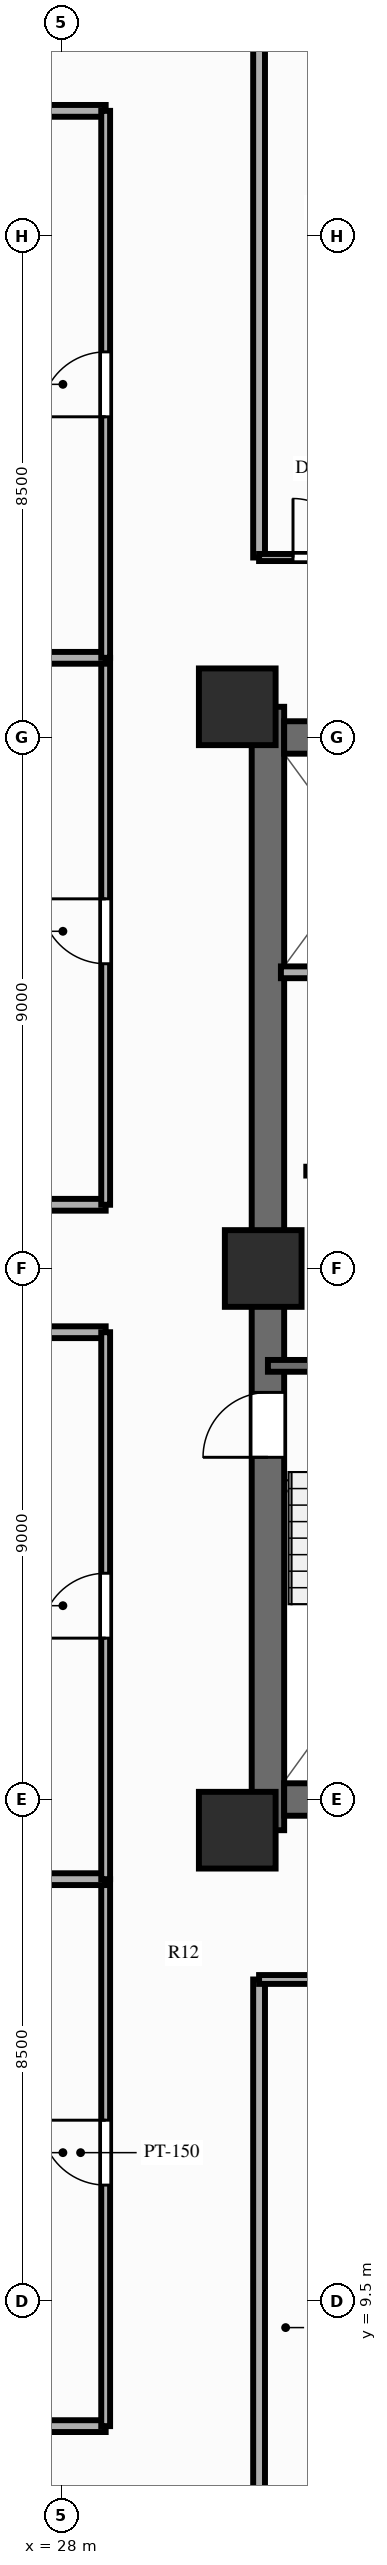
"""IFC4 building model, lengths in metres.
Left out: names, types, materials, properties, quantities, classifications, styles, units other than length and angle.
Written with IfcOpenShell. Run it as: python <this file> out.ifc"""

import sys

from ifc_helpers import new_model, si_unit, direction, frame, frame_2d, origin, origin_2d, place, context, subcontext, project, spatial, rectangle, extrude, source, transform, mapped, element, fill, save


model = new_model("IFC4")
c1 = context("Model", 3, precision=1e-05, world=origin(), true_north=direction((0.0, 1.0)))
c2 = subcontext(c1, "Body", "Model", "MODEL_VIEW")
j1 = project(units=[si_unit("LENGTHUNIT", "METRE"), si_unit("PLANEANGLEUNIT", "RADIAN")], contexts=[c1])
p1 = place(None, origin())
s1 = spatial("IfcSite", under=j1, at=p1, CompositionType="ELEMENT")
p2 = place(p1, origin())
s2 = spatial("IfcBuilding", under=s1, at=p2, CompositionType="ELEMENT")
p3 = place(p2, frame((0.0, 0.0, 95.85)))
s3 = spatial("IfcBuildingStorey", under=s2, at=p3, CompositionType="ELEMENT", Elevation=95.85)
p4 = place(p3, frame((31.5, 17.48, 0.0), z_axis=(0.0, 0.0, 1.0), x_axis=(0.0, 1.0, 0.0)))
e1 = element("IfcWall", 1, at=p4, inside=s3, PredefinedType="SHEAR", context=c2, shape_type="SweptSolid", body=[
    extrude(rectangle(XDim=19.04, YDim=0.55, at=frame_2d((9.52, 0.0))), origin(), (0.0, 0.0, 1.0), 3.0),
])
p5 = place(p4, frame((6.32, 0.0, 0.0)))
e2 = element("IfcOpeningElement", 2, at=p5, cuts=e1, PredefinedType="OPENING", context=c2, shape_type="SweptSolid", body=[
    extrude(rectangle(XDim=1.1, YDim=2.15, at=frame_2d((0.55, 1.075))), frame((0.0, 0.287, 0.0), z_axis=(0.0, -1.0, 0.0), x_axis=(1.0, 0.0, 0.0)), (0.0, 0.0, 1.0), 0.574),
])
p6 = place(p3, frame((31.775, 18.0, 0.0), z_axis=(0.0, 0.0, 1.0), x_axis=(1.0, 0.0, 0.0)))
e3 = element("IfcWall", 3, at=p6, inside=s3, PredefinedType="SHEAR", context=c2, shape_type="SweptSolid", body=[
    extrude(rectangle(XDim=12.45, YDim=0.55, at=frame_2d((6.225, 0.0))), origin(), (0.0, 0.0, 1.0), 3.0),
])
p7 = place(p3, frame((31.775, 36.0, 0.0), z_axis=(0.0, 0.0, 1.0), x_axis=(1.0, 0.0, 0.0)))
e4 = element("IfcWall", 4, at=p7, inside=s3, PredefinedType="SHEAR", context=c2, shape_type="SweptSolid", body=[
    extrude(rectangle(XDim=12.45, YDim=0.55, at=frame_2d((6.225, 0.0))), origin(), (0.0, 0.0, 1.0), 3.0),
])
p8 = place(p7, frame((5.175, 0.0, 0.0), z_axis=(0.0, 0.0, 1.0), x_axis=(-1.0, 0.0, 0.0)))
e5 = element("IfcOpeningElement", 5, at=p8, cuts=e4, PredefinedType="OPENING", context=c2, shape_type="SweptSolid", body=[
    extrude(rectangle(XDim=1.4, YDim=2.15, at=frame_2d((0.7, 1.075))), frame((0.0, 0.287, 0.0), z_axis=(0.0, -1.0, 0.0), x_axis=(1.0, 0.0, 0.0)), (0.0, 0.0, 1.0), 0.574),
])
m1 = source(origin(), c2, "Body", "SweptSolid", [
    extrude(rectangle(XDim=1.3, YDim=1.3, at=origin_2d()), origin(), (0.0, 0.0, 1.0), 3.0),
])
for number, where, z_axis, x_axis in (
    (6, (30.98, 17.48, 0.0), (0.0, 0.0, 1.0), (1.0, 0.0, 0.0)),
    (7, (30.98, 36.52, 0.0), (0.0, 0.0, 1.0), (1.0, 0.0, 0.0)),
    (8, (31.42, 27.0, 0.0), (0.0, 0.0, 1.0), (1.0, 0.0, 0.0)),
):
    element("IfcColumn", number, at=place(p3, frame(where, z_axis=z_axis, x_axis=x_axis)), inside=s3, PredefinedType="COLUMN", context=c2, shape_type="MappedRepresentation", body=[
        mapped(m1, transform((0.0, 0.0, 0.0), scale=1.0)),
    ])
p9 = place(p3, frame((32.15, 28.65, 0.0), z_axis=(0.0, 0.0, 1.0), x_axis=(1.0, 0.0, 0.0)))
e9 = element("IfcWall", 9, at=p9, inside=s3, PredefinedType="PARTITIONING", context=c2, shape_type="SweptSolid", body=[
    extrude(rectangle(XDim=2.27, YDim=0.15, at=frame_2d((1.135, 0.0))), origin(), (0.0, 0.0, 1.0), 2.14),
])
p10 = place(p3, frame((31.5, 25.35, 0.0), z_axis=(0.0, 0.0, 1.0), x_axis=(1.0, 0.0, 0.0)))
e10 = element("IfcWall", 10, at=p10, inside=s3, PredefinedType="SOLIDWALL", context=c2, shape_type="SweptSolid", body=[
    extrude(rectangle(XDim=3.93, YDim=0.2, at=frame_2d((1.965, 0.0))), origin(), (0.0, 0.0, 1.0), 2.79),
])
p11 = place(p3, frame((31.72, 32.02, 0.0), z_axis=(0.0, 0.0, 1.0), x_axis=(1.0, 0.0, 0.0)))
e11 = element("IfcWall", 11, at=p11, inside=s3, PredefinedType="PARTITIONING", context=c2, shape_type="SweptSolid", body=[
    extrude(rectangle(XDim=2.8, YDim=0.2, at=frame_2d((1.4, 0.0))), origin(), (0.0, 0.0, 1.0), 2.79),
])
p12 = place(p3, frame((31.35, 14.95, 0.0), z_axis=(0.0, 0.0, 1.0), x_axis=(0.0, -1.0, 0.0)))
e12 = element("IfcWall", 12, at=p12, inside=s3, PredefinedType="PARTITIONING", context=c2, shape_type="SweptSolid", body=[
    extrude(rectangle(XDim=11.8, YDim=0.2, at=frame_2d((5.9, 0.0))), origin(), (0.0, 0.0, 1.0), 2.34),
])
p13 = place(p3, frame((31.35, 14.95, 0.0), z_axis=(0.0, 0.0, 1.0), x_axis=(1.0, 0.0, 0.0)))
e13 = element("IfcWall", 13, at=p13, inside=s3, PredefinedType="PARTITIONING", context=c2, shape_type="SweptSolid", body=[
    extrude(rectangle(XDim=6.384, YDim=0.15, at=frame_2d((3.192, 0.0))), origin(), (0.0, 0.0, 1.0), 2.79),
])
p14 = place(p13, frame((2.642, 0.0, 0.0)))
e14 = element("IfcOpeningElement", 14, at=p14, cuts=e13, PredefinedType="OPENING", context=c2, shape_type="SweptSolid", body=[
    extrude(rectangle(XDim=1.1, YDim=2.15, at=frame_2d((0.55, 1.075))), frame((0.0, 0.087, 0.0), z_axis=(0.0, -1.0, 0.0), x_axis=(1.0, 0.0, 0.0)), (0.0, 0.0, 1.0), 0.174),
])
p15 = place(p3, frame((31.35, 39.05, 0.0), z_axis=(0.0, 0.0, 1.0), x_axis=(0.0, 1.0, 0.0)))
e15 = element("IfcWall", 15, at=p15, inside=s3, PredefinedType="PARTITIONING", context=c2, shape_type="SweptSolid", body=[
    extrude(rectangle(XDim=11.8, YDim=0.2, at=frame_2d((5.9, 0.0))), origin(), (0.0, 0.0, 1.0), 2.34),
])
p16 = place(p3, frame((31.35, 39.05, 0.0), z_axis=(0.0, 0.0, 1.0), x_axis=(1.0, 0.0, 0.0)))
e16 = element("IfcWall", 16, at=p16, inside=s3, PredefinedType="PARTITIONING", context=c2, shape_type="SweptSolid", body=[
    extrude(rectangle(XDim=2.15, YDim=0.12, at=frame_2d((1.075, 0.0))), origin(), (0.0, 0.0, 1.0), 2.79),
])
p17 = place(p16, frame((0.575, 0.0, 0.0)))
e17 = element("IfcOpeningElement", 17, at=p17, cuts=e16, PredefinedType="OPENING", context=c2, shape_type="SweptSolid", body=[
    extrude(rectangle(XDim=1.0, YDim=2.1, at=frame_2d((0.5, 1.05))), frame((0.0, 0.072, 0.0), z_axis=(0.0, -1.0, 0.0), x_axis=(1.0, 0.0, 0.0)), (0.0, 0.0, 1.0), 0.144),
])
for number, where, z_axis, x_axis in (
    (18, (28.75, 7.38, 0.0), (0.0, 0.0, 1.0), (-1.0, 0.0, 0.0)),
    (19, (28.75, 25.92, 0.0), (0.0, 0.0, 1.0), (-1.0, 0.0, 0.0)),
):
    element("IfcWall", number, at=place(p3, frame(where, z_axis=z_axis, x_axis=x_axis)), inside=s3, PredefinedType="PARTITIONING", context=c2, shape_type="SweptSolid", body=[
        extrude(rectangle(XDim=16.6, YDim=0.2, at=frame_2d((8.3, 0.0))), origin(), (0.0, 0.0, 1.0), 2.79),
    ])
p18 = place(p3, frame((28.75, 7.38, 0.0), z_axis=(0.0, 0.0, 1.0), x_axis=(0.0, 1.0, 0.0)))
e20 = element("IfcWall", 20, at=p18, inside=s3, PredefinedType="PARTITIONING", context=c2, shape_type="SweptSolid", body=[
    extrude(rectangle(XDim=9.27, YDim=0.15, at=frame_2d((4.635, 0.0))), origin(), (0.0, 0.0, 1.0), 2.79),
])
p19 = place(p18, frame((4.085, 0.0, 0.0)))
e21 = element("IfcOpeningElement", 21, at=p19, cuts=e20, PredefinedType="OPENING", context=c2, shape_type="SweptSolid", body=[
    extrude(rectangle(XDim=1.1, YDim=2.15, at=frame_2d((0.55, 1.075))), frame((0.0, 0.087, 0.0), z_axis=(0.0, -1.0, 0.0), x_axis=(1.0, 0.0, 0.0)), (0.0, 0.0, 1.0), 0.174),
])
p20 = place(p3, frame((28.75, 16.65, 0.0), z_axis=(0.0, 0.0, 1.0), x_axis=(-1.0, 0.0, 0.0)))
e22 = element("IfcWall", 22, at=p20, inside=s3, PredefinedType="PARTITIONING", context=c2, shape_type="SweptSolid", body=[
    extrude(rectangle(XDim=16.6, YDim=0.2, at=frame_2d((8.3, 0.0))), origin(), (0.0, 0.0, 1.0), 2.79),
])
p21 = place(p3, frame((28.75, 16.65, 0.0), z_axis=(0.0, 0.0, 1.0), x_axis=(0.0, 1.0, 0.0)))
e23 = element("IfcWall", 23, at=p21, inside=s3, PredefinedType="PARTITIONING", context=c2, shape_type="SweptSolid", body=[
    extrude(rectangle(XDim=9.27, YDim=0.15, at=frame_2d((4.635, 0.0))), origin(), (0.0, 0.0, 1.0), 2.79),
])
p22 = place(p21, frame((4.085, 0.0, 0.0)))
e24 = element("IfcOpeningElement", 24, at=p22, cuts=e23, PredefinedType="OPENING", context=c2, shape_type="SweptSolid", body=[
    extrude(rectangle(XDim=1.1, YDim=2.15, at=frame_2d((0.55, 1.075))), frame((0.0, 0.087, 0.0), z_axis=(0.0, -1.0, 0.0), x_axis=(1.0, 0.0, 0.0)), (0.0, 0.0, 1.0), 0.174),
])
for number, where, z_axis, x_axis in (
    (25, (28.75, 28.08, 0.0), (0.0, 0.0, 1.0), (-1.0, 0.0, 0.0)),
    (26, (28.75, 46.62, 0.0), (0.0, 0.0, 1.0), (-1.0, 0.0, 0.0)),
):
    element("IfcWall", number, at=place(p3, frame(where, z_axis=z_axis, x_axis=x_axis)), inside=s3, PredefinedType="PARTITIONING", context=c2, shape_type="SweptSolid", body=[
        extrude(rectangle(XDim=16.6, YDim=0.2, at=frame_2d((8.3, 0.0))), origin(), (0.0, 0.0, 1.0), 2.79),
    ])
p23 = place(p3, frame((28.75, 28.08, 0.0), z_axis=(0.0, 0.0, 1.0), x_axis=(0.0, 1.0, 0.0)))
e27 = element("IfcWall", 27, at=p23, inside=s3, PredefinedType="PARTITIONING", context=c2, shape_type="SweptSolid", body=[
    extrude(rectangle(XDim=9.27, YDim=0.15, at=frame_2d((4.635, 0.0))), origin(), (0.0, 0.0, 1.0), 2.79),
])
p24 = place(p23, frame((4.085, 0.0, 0.0)))
e28 = element("IfcOpeningElement", 28, at=p24, cuts=e27, PredefinedType="OPENING", context=c2, shape_type="SweptSolid", body=[
    extrude(rectangle(XDim=1.1, YDim=2.15, at=frame_2d((0.55, 1.075))), frame((0.0, 0.087, 0.0), z_axis=(0.0, -1.0, 0.0), x_axis=(1.0, 0.0, 0.0)), (0.0, 0.0, 1.0), 0.174),
])
p25 = place(p3, frame((28.75, 37.35, 0.0), z_axis=(0.0, 0.0, 1.0), x_axis=(-1.0, 0.0, 0.0)))
e29 = element("IfcWall", 29, at=p25, inside=s3, PredefinedType="PARTITIONING", context=c2, shape_type="SweptSolid", body=[
    extrude(rectangle(XDim=16.6, YDim=0.2, at=frame_2d((8.3, 0.0))), origin(), (0.0, 0.0, 1.0), 2.79),
])
p26 = place(p3, frame((28.75, 37.35, 0.0), z_axis=(0.0, 0.0, 1.0), x_axis=(0.0, 1.0, 0.0)))
e30 = element("IfcWall", 30, at=p26, inside=s3, PredefinedType="PARTITIONING", context=c2, shape_type="SweptSolid", body=[
    extrude(rectangle(XDim=9.27, YDim=0.15, at=frame_2d((4.635, 0.0))), origin(), (0.0, 0.0, 1.0), 2.79),
])
p27 = place(p26, frame((4.085, 0.0, 0.0)))
e31 = element("IfcOpeningElement", 31, at=p27, cuts=e30, PredefinedType="OPENING", context=c2, shape_type="SweptSolid", body=[
    extrude(rectangle(XDim=1.1, YDim=2.15, at=frame_2d((0.55, 1.075))), frame((0.0, 0.087, 0.0), z_axis=(0.0, -1.0, 0.0), x_axis=(1.0, 0.0, 0.0)), (0.0, 0.0, 1.0), 0.174),
])
m2 = source(origin(), c2, "Body", "SweptSolid", [
    extrude(rectangle(XDim=1.1, YDim=2.15, at=frame_2d((0.55, 1.075))), frame((0.0, 0.025, 0.0), z_axis=(0.0, -1.0, 0.0), x_axis=(1.0, 0.0, 0.0)), (0.0, 0.0, 1.0), 0.05),
])
p28 = place(p5, origin())
e32 = element("IfcDoor", 32, at=p28, inside=s3, OperationType="SINGLE_SWING_LEFT", PredefinedType="DOOR", context=c2, shape_type="MappedRepresentation", body=[
    mapped(m2, transform((0.0, 0.0, 0.0), scale=1.0)),
])
fill(e2, e32)
m3 = source(origin(), c2, "Body", "SweptSolid", [
    extrude(rectangle(XDim=1.0, YDim=2.1, at=frame_2d((0.5, 1.05))), frame((0.0, 0.025, 0.0), z_axis=(0.0, -1.0, 0.0), x_axis=(1.0, 0.0, 0.0)), (0.0, 0.0, 1.0), 0.05),
])
p29 = place(p17, origin())
e33 = element("IfcDoor", 33, at=p29, inside=s3, OperationType="SINGLE_SWING_LEFT", PredefinedType="DOOR", context=c2, shape_type="MappedRepresentation", body=[
    mapped(m3, transform((0.0, 0.0, 0.0), scale=1.0)),
])
fill(e17, e33)
p30 = place(p19, origin())
e34 = element("IfcDoor", 34, at=p30, inside=s3, OperationType="SINGLE_SWING_RIGHT", PredefinedType="DOOR", context=c2, shape_type="MappedRepresentation", body=[
    mapped(m2, transform((0.0, 0.0, 0.0), scale=1.0)),
])
fill(e21, e34)
p31 = place(p22, origin())
e35 = element("IfcDoor", 35, at=p31, inside=s3, OperationType="SINGLE_SWING_LEFT", PredefinedType="DOOR", context=c2, shape_type="MappedRepresentation", body=[
    mapped(m2, transform((0.0, 0.0, 0.0), scale=1.0)),
])
fill(e24, e35)
p32 = place(p24, origin())
e36 = element("IfcDoor", 36, at=p32, inside=s3, OperationType="SINGLE_SWING_RIGHT", PredefinedType="DOOR", context=c2, shape_type="MappedRepresentation", body=[
    mapped(m2, transform((0.0, 0.0, 0.0), scale=1.0)),
])
fill(e28, e36)
p33 = place(p27, origin())
e37 = element("IfcDoor", 37, at=p33, inside=s3, OperationType="SINGLE_SWING_LEFT", PredefinedType="DOOR", context=c2, shape_type="MappedRepresentation", body=[
    mapped(m2, transform((0.0, 0.0, 0.0), scale=1.0)),
])
fill(e31, e37)
save(model, sys.argv[1])
